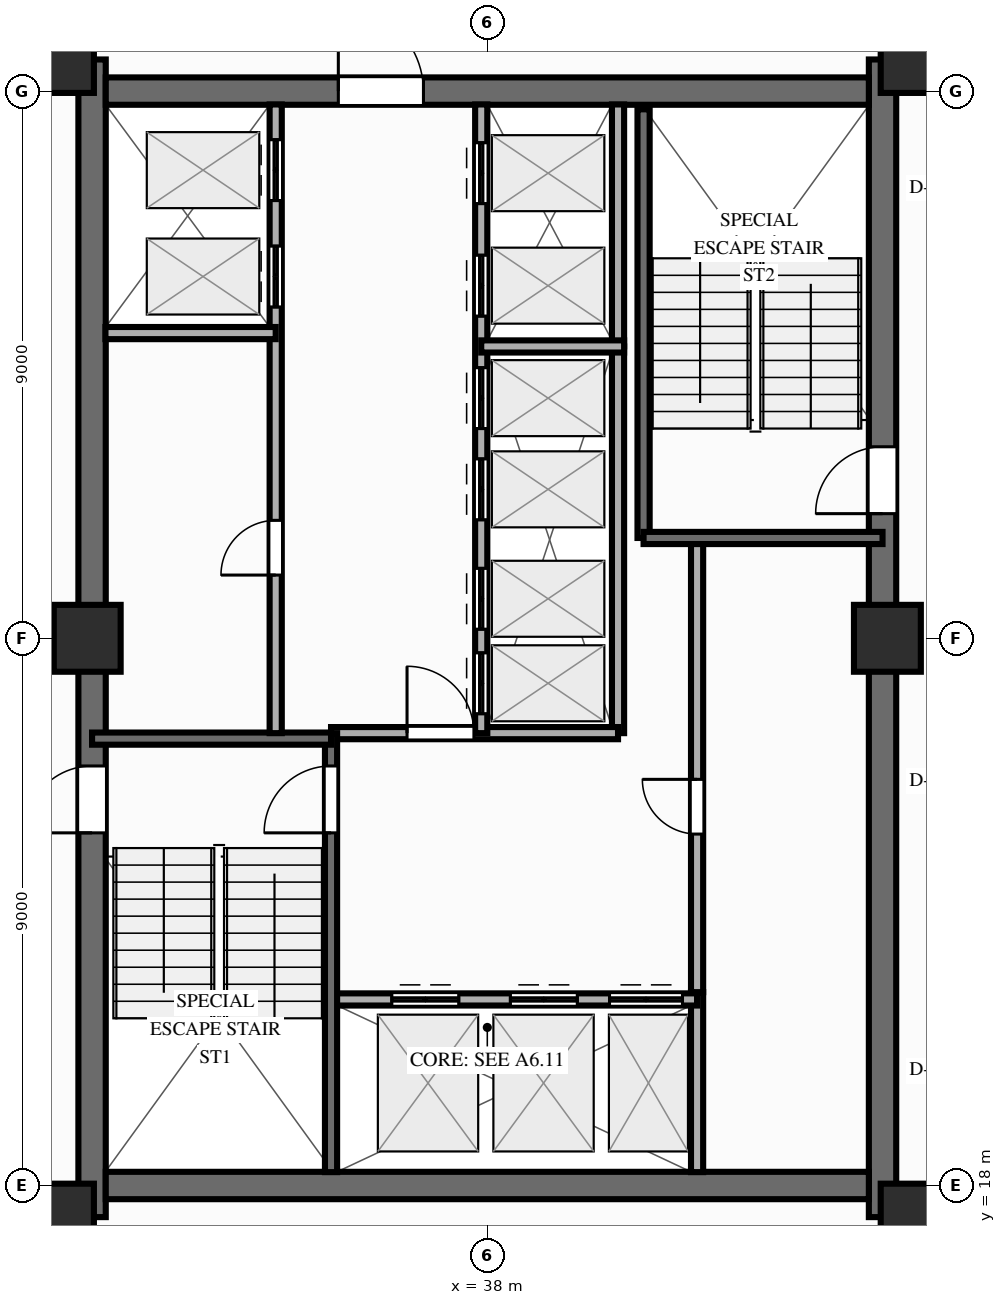
"""IFC4 building model, lengths in metres.
Left out: names, types, materials, properties, quantities, classifications, styles, units other than length and angle.
Written with IfcOpenShell. Run it as: python <this file> out.ifc"""

import sys

from ifc_helpers import new_model, si_unit, direction, frame, frame_2d, origin, origin_2d, place, context, subcontext, project, spatial, rectangle, extrude, source, transform, mapped, element, fill, save


model = new_model("IFC4")
c1 = context("Model", 3, precision=1e-05, world=origin(), true_north=direction((0.0, 1.0)))
c2 = subcontext(c1, "Body", "Model", "MODEL_VIEW")
j1 = project(units=[si_unit("LENGTHUNIT", "METRE"), si_unit("PLANEANGLEUNIT", "RADIAN")], contexts=[c1])
p1 = place(None, origin())
s1 = spatial("IfcSite", under=j1, at=p1, CompositionType="ELEMENT")
p2 = place(p1, origin())
s2 = spatial("IfcBuilding", under=s1, at=p2, CompositionType="ELEMENT")
p3 = place(p2, frame((0.0, 0.0, 169.0)))
s3 = spatial("IfcBuildingStorey", under=s2, at=p3, CompositionType="ELEMENT", Elevation=169.0)
p4 = place(p3, frame((31.5, 17.48, 0.0), z_axis=(0.0, 0.0, 1.0), x_axis=(0.0, 1.0, 0.0)))
e1 = element("IfcWall", 1, at=p4, inside=s3, PredefinedType="SHEAR", context=c2, shape_type="SweptSolid", body=[
    extrude(rectangle(XDim=19.04, YDim=0.45, at=frame_2d((9.52, 0.0))), origin(), (0.0, 0.0, 1.0), 3.9),
])
p5 = place(p4, frame((6.32, 0.0, 0.0)))
e2 = element("IfcOpeningElement", 2, at=p5, cuts=e1, PredefinedType="OPENING", context=c2, shape_type="SweptSolid", body=[
    extrude(rectangle(XDim=1.1, YDim=2.15, at=frame_2d((0.55, 1.075))), frame((0.0, 0.237, 0.0), z_axis=(0.0, -1.0, 0.0), x_axis=(1.0, 0.0, 0.0)), (0.0, 0.0, 1.0), 0.474),
])
p6 = place(p3, frame((44.5, 17.48, 0.0), z_axis=(0.0, 0.0, 1.0), x_axis=(0.0, 1.0, 0.0)))
e3 = element("IfcWall", 3, at=p6, inside=s3, PredefinedType="SHEAR", context=c2, shape_type="SweptSolid", body=[
    extrude(rectangle(XDim=19.04, YDim=0.45, at=frame_2d((9.52, 0.0))), origin(), (0.0, 0.0, 1.0), 3.9),
])
p7 = place(p6, frame((12.67, 0.0, 0.0), z_axis=(0.0, 0.0, 1.0), x_axis=(-1.0, 0.0, 0.0)))
e4 = element("IfcOpeningElement", 4, at=p7, cuts=e3, PredefinedType="OPENING", context=c2, shape_type="SweptSolid", body=[
    extrude(rectangle(XDim=1.1, YDim=2.15, at=frame_2d((0.55, 1.075))), frame((0.0, 0.237, 0.0), z_axis=(0.0, -1.0, 0.0), x_axis=(1.0, 0.0, 0.0)), (0.0, 0.0, 1.0), 0.474),
])
p8 = place(p3, frame((31.725, 18.0, 0.0), z_axis=(0.0, 0.0, 1.0), x_axis=(1.0, 0.0, 0.0)))
e5 = element("IfcWall", 5, at=p8, inside=s3, PredefinedType="SHEAR", context=c2, shape_type="SweptSolid", body=[
    extrude(rectangle(XDim=12.55, YDim=0.45, at=frame_2d((6.275, 0.0))), origin(), (0.0, 0.0, 1.0), 3.9),
])
p9 = place(p3, frame((31.725, 36.0, 0.0), z_axis=(0.0, 0.0, 1.0), x_axis=(1.0, 0.0, 0.0)))
e6 = element("IfcWall", 6, at=p9, inside=s3, PredefinedType="SHEAR", context=c2, shape_type="SweptSolid", body=[
    extrude(rectangle(XDim=12.55, YDim=0.45, at=frame_2d((6.275, 0.0))), origin(), (0.0, 0.0, 1.0), 3.9),
])
p10 = place(p9, frame((5.225, 0.0, 0.0), z_axis=(0.0, 0.0, 1.0), x_axis=(-1.0, 0.0, 0.0)))
e7 = element("IfcOpeningElement", 7, at=p10, cuts=e6, PredefinedType="OPENING", context=c2, shape_type="SweptSolid", body=[
    extrude(rectangle(XDim=1.4, YDim=2.15, at=frame_2d((0.7, 1.075))), frame((0.0, 0.237, 0.0), z_axis=(0.0, -1.0, 0.0), x_axis=(1.0, 0.0, 0.0)), (0.0, 0.0, 1.0), 0.474),
])
m1 = source(origin(), c2, "Body", "SweptSolid", [
    extrude(rectangle(XDim=1.1, YDim=1.1, at=origin_2d()), origin(), (0.0, 0.0, 1.0), 3.9),
])
for number, where, z_axis, x_axis in (
    (8, (30.98, 17.48, 0.0), (0.0, 0.0, 1.0), (1.0, 0.0, 0.0)),
    (9, (45.02, 17.48, 0.0), (0.0, 0.0, 1.0), (1.0, 0.0, 0.0)),
    (10, (30.98, 36.52, 0.0), (0.0, 0.0, 1.0), (1.0, 0.0, 0.0)),
    (11, (45.02, 36.52, 0.0), (0.0, 0.0, 1.0), (1.0, 0.0, 0.0)),
    (12, (31.42, 27.0, 0.0), (0.0, 0.0, 1.0), (1.0, 0.0, 0.0)),
    (13, (44.58, 27.0, 0.0), (0.0, 0.0, 1.0), (1.0, 0.0, 0.0)),
):
    element("IfcColumn", number, at=place(p3, frame(where, z_axis=z_axis, x_axis=x_axis)), inside=s3, PredefinedType="COLUMN", context=c2, shape_type="MappedRepresentation", body=[
        mapped(m1, transform((0.0, 0.0, 0.0), scale=1.0)),
    ])
p11 = place(p3, frame((41.45, 18.22, 0.0), z_axis=(0.0, 0.0, 1.0), x_axis=(0.0, 1.0, 0.0)))
e14 = element("IfcWall", 14, at=p11, inside=s3, PredefinedType="PARTITIONING", context=c2, shape_type="SweptSolid", body=[
    extrude(rectangle(XDim=2.96, YDim=0.2, at=frame_2d((1.48, 0.0))), origin(), (0.0, 0.0, 1.0), 3.56),
])
p12 = place(p3, frame((41.45, 21.18, 0.0), z_axis=(0.0, 0.0, 1.0), x_axis=(0.0, 1.0, 0.0)))
e15 = element("IfcWall", 15, at=p12, inside=s3, PredefinedType="PARTITIONING", context=c2, shape_type="SweptSolid", body=[
    extrude(rectangle(XDim=7.42, YDim=0.2, at=frame_2d((3.71, 0.0))), origin(), (0.0, 0.0, 1.0), 3.56),
])
p13 = place(p12, frame((2.6, 0.0, 0.0)))
e16 = element("IfcOpeningElement", 16, at=p13, cuts=e15, PredefinedType="OPENING", context=c2, shape_type="SweptSolid", body=[
    extrude(rectangle(XDim=0.9, YDim=2.1, at=frame_2d((0.45, 1.05))), frame((0.0, 0.112, 0.0), z_axis=(0.0, -1.0, 0.0), x_axis=(1.0, 0.0, 0.0)), (0.0, 0.0, 1.0), 0.224),
])
p14 = place(p3, frame((40.15, 25.44, 0.0), z_axis=(0.0, 0.0, 1.0), x_axis=(0.0, 1.0, 0.0)))
e17 = element("IfcWall", 17, at=p14, inside=s3, PredefinedType="PARTITIONING", context=c2, shape_type="SweptSolid", body=[
    extrude(rectangle(XDim=6.36, YDim=0.2, at=frame_2d((3.18, 0.0))), origin(), (0.0, 0.0, 1.0), 3.56),
])
p15 = place(p3, frame((40.15, 31.8, 0.0), z_axis=(0.0, 0.0, 1.0), x_axis=(0.0, 1.0, 0.0)))
e18 = element("IfcWall", 18, at=p15, inside=s3, PredefinedType="PARTITIONING", context=c2, shape_type="SweptSolid", body=[
    extrude(rectangle(XDim=3.98, YDim=0.2, at=frame_2d((1.99, 0.0))), origin(), (0.0, 0.0, 1.0), 3.56),
])
p16 = place(p3, frame((35.43, 21.06, 0.0), z_axis=(0.0, 0.0, 1.0), x_axis=(1.0, 0.0, 0.0)))
e19 = element("IfcWall", 19, at=p16, inside=s3, PredefinedType="PARTITIONING", context=c2, shape_type="SweptSolid", body=[
    extrude(rectangle(XDim=6.02, YDim=0.2, at=frame_2d((3.01, 0.0))), origin(), (0.0, 0.0, 1.0), 3.56),
])
p17 = place(p16, frame((1.0, 0.0, 0.0)))
e20 = element("IfcOpeningElement", 20, at=p17, cuts=e19, PredefinedType="OPENING", context=c2, shape_type="SweptSolid", body=[
    extrude(rectangle(XDim=1.1, YDim=2.15, at=frame_2d((0.55, 1.075))), frame((0.0, 0.112, 0.0), z_axis=(0.0, -1.0, 0.0), x_axis=(1.0, 0.0, 0.0)), (0.0, 0.0, 1.0), 0.224),
])
p18 = place(p16, frame((2.95, 0.0, 0.0)))
e21 = element("IfcOpeningElement", 21, at=p18, cuts=e19, PredefinedType="OPENING", context=c2, shape_type="SweptSolid", body=[
    extrude(rectangle(XDim=1.1, YDim=2.15, at=frame_2d((0.55, 1.075))), frame((0.0, 0.112, 0.0), z_axis=(0.0, -1.0, 0.0), x_axis=(1.0, 0.0, 0.0)), (0.0, 0.0, 1.0), 0.224),
])
p19 = place(p16, frame((4.58, 0.0, 0.0)))
e22 = element("IfcOpeningElement", 22, at=p19, cuts=e19, PredefinedType="OPENING", context=c2, shape_type="SweptSolid", body=[
    extrude(rectangle(XDim=1.2, YDim=2.15, at=frame_2d((0.6, 1.075))), frame((0.0, 0.112, 0.0), z_axis=(0.0, -1.0, 0.0), x_axis=(1.0, 0.0, 0.0)), (0.0, 0.0, 1.0), 0.224),
])
p20 = place(p3, frame((35.43, 25.44, 0.0), z_axis=(0.0, 0.0, 1.0), x_axis=(1.0, 0.0, 0.0)))
e23 = element("IfcWall", 23, at=p20, inside=s3, PredefinedType="PARTITIONING", context=c2, shape_type="SweptSolid", body=[
    extrude(rectangle(XDim=4.72, YDim=0.2, at=frame_2d((2.36, 0.0))), origin(), (0.0, 0.0, 1.0), 3.56),
])
p21 = place(p20, frame((1.25, 0.0, 0.0)))
e24 = element("IfcOpeningElement", 24, at=p21, cuts=e23, PredefinedType="OPENING", context=c2, shape_type="SweptSolid", body=[
    extrude(rectangle(XDim=1.1, YDim=2.15, at=frame_2d((0.55, 1.075))), frame((0.0, 0.112, 0.0), z_axis=(0.0, -1.0, 0.0), x_axis=(1.0, 0.0, 0.0)), (0.0, 0.0, 1.0), 0.224),
])
p22 = place(p3, frame((35.43, 18.22, 0.0), z_axis=(0.0, 0.0, 1.0), x_axis=(0.0, 1.0, 0.0)))
e25 = element("IfcWall", 25, at=p22, inside=s3, PredefinedType="SOLIDWALL", context=c2, shape_type="SweptSolid", body=[
    extrude(rectangle(XDim=7.22, YDim=0.2, at=frame_2d((3.61, 0.0))), origin(), (0.0, 0.0, 1.0), 3.69),
])
p23 = place(p22, frame((6.68, 0.0, 0.0), z_axis=(0.0, 0.0, 1.0), x_axis=(-1.0, 0.0, 0.0)))
e26 = element("IfcOpeningElement", 26, at=p23, cuts=e25, PredefinedType="OPENING", context=c2, shape_type="SweptSolid", body=[
    extrude(rectangle(XDim=1.1, YDim=2.15, at=frame_2d((0.55, 1.075))), frame((0.0, 0.112, 0.0), z_axis=(0.0, -1.0, 0.0), x_axis=(1.0, 0.0, 0.0)), (0.0, 0.0, 1.0), 0.224),
])
p24 = place(p3, frame((31.5, 25.35, 0.0), z_axis=(0.0, 0.0, 1.0), x_axis=(1.0, 0.0, 0.0)))
e27 = element("IfcWall", 27, at=p24, inside=s3, PredefinedType="SOLIDWALL", context=c2, shape_type="SweptSolid", body=[
    extrude(rectangle(XDim=3.93, YDim=0.2, at=frame_2d((1.965, 0.0))), origin(), (0.0, 0.0, 1.0), 3.69),
])
p25 = place(p3, frame((40.57, 28.65, 0.0), z_axis=(0.0, 0.0, 1.0), x_axis=(0.0, 1.0, 0.0)))
e28 = element("IfcWall", 28, at=p25, inside=s3, PredefinedType="SOLIDWALL", context=c2, shape_type="SweptSolid", body=[
    extrude(rectangle(XDim=7.05, YDim=0.2, at=frame_2d((3.525, 0.0))), origin(), (0.0, 0.0, 1.0), 3.69),
])
p26 = place(p3, frame((40.57, 28.65, 0.0), z_axis=(0.0, 0.0, 1.0), x_axis=(1.0, 0.0, 0.0)))
e29 = element("IfcWall", 29, at=p26, inside=s3, PredefinedType="SOLIDWALL", context=c2, shape_type="SweptSolid", body=[
    extrude(rectangle(XDim=3.93, YDim=0.2, at=frame_2d((1.965, 0.0))), origin(), (0.0, 0.0, 1.0), 3.69),
])
p27 = place(p3, frame((34.52, 25.44, 0.0), z_axis=(0.0, 0.0, 1.0), x_axis=(0.0, 1.0, 0.0)))
e30 = element("IfcWall", 30, at=p27, inside=s3, PredefinedType="PARTITIONING", context=c2, shape_type="SweptSolid", body=[
    extrude(rectangle(XDim=10.34, YDim=0.2, at=frame_2d((5.17, 0.0))), origin(), (0.0, 0.0, 1.0), 3.56),
])
p28 = place(p27, frame((2.6, 0.0, 0.0)))
e31 = element("IfcOpeningElement", 31, at=p28, cuts=e30, PredefinedType="OPENING", context=c2, shape_type="SweptSolid", body=[
    extrude(rectangle(XDim=0.9, YDim=2.1, at=frame_2d((0.45, 1.05))), frame((0.0, 0.112, 0.0), z_axis=(0.0, -1.0, 0.0), x_axis=(1.0, 0.0, 0.0)), (0.0, 0.0, 1.0), 0.224),
])
p29 = place(p27, frame((7.01, 0.0, 0.0)))
e32 = element("IfcOpeningElement", 32, at=p29, cuts=e30, PredefinedType="OPENING", context=c2, shape_type="SweptSolid", body=[
    extrude(rectangle(XDim=1.0, YDim=2.15, at=frame_2d((0.5, 1.075))), frame((0.0, 0.112, 0.0), z_axis=(0.0, -1.0, 0.0), x_axis=(1.0, 0.0, 0.0)), (0.0, 0.0, 1.0), 0.224),
])
p30 = place(p27, frame((8.76, 0.0, 0.0)))
e33 = element("IfcOpeningElement", 33, at=p30, cuts=e30, PredefinedType="OPENING", context=c2, shape_type="SweptSolid", body=[
    extrude(rectangle(XDim=1.0, YDim=2.15, at=frame_2d((0.5, 1.075))), frame((0.0, 0.112, 0.0), z_axis=(0.0, -1.0, 0.0), x_axis=(1.0, 0.0, 0.0)), (0.0, 0.0, 1.0), 0.224),
])
p31 = place(p3, frame((31.72, 32.02, 0.0), z_axis=(0.0, 0.0, 1.0), x_axis=(1.0, 0.0, 0.0)))
e34 = element("IfcWall", 34, at=p31, inside=s3, PredefinedType="PARTITIONING", context=c2, shape_type="SweptSolid", body=[
    extrude(rectangle(XDim=2.8, YDim=0.2, at=frame_2d((1.4, 0.0))), origin(), (0.0, 0.0, 1.0), 3.56),
])
p32 = place(p3, frame((37.9, 25.44, 0.0), z_axis=(0.0, 0.0, 1.0), x_axis=(0.0, 1.0, 0.0)))
e35 = element("IfcWall", 35, at=p32, inside=s3, PredefinedType="PARTITIONING", context=c2, shape_type="SweptSolid", body=[
    extrude(rectangle(XDim=10.34, YDim=0.2, at=frame_2d((5.17, 0.0))), origin(), (0.0, 0.0, 1.0), 3.56),
])
p33 = place(p32, frame((0.32, 0.0, 0.0)))
e36 = element("IfcOpeningElement", 36, at=p33, cuts=e35, PredefinedType="OPENING", context=c2, shape_type="SweptSolid", body=[
    extrude(rectangle(XDim=1.0, YDim=2.15, at=frame_2d((0.5, 1.075))), frame((0.0, 0.112, 0.0), z_axis=(0.0, -1.0, 0.0), x_axis=(1.0, 0.0, 0.0)), (0.0, 0.0, 1.0), 0.224),
])
p34 = place(p32, frame((1.71, 0.0, 0.0)))
e37 = element("IfcOpeningElement", 37, at=p34, cuts=e35, PredefinedType="OPENING", context=c2, shape_type="SweptSolid", body=[
    extrude(rectangle(XDim=1.0, YDim=2.15, at=frame_2d((0.5, 1.075))), frame((0.0, 0.112, 0.0), z_axis=(0.0, -1.0, 0.0), x_axis=(1.0, 0.0, 0.0)), (0.0, 0.0, 1.0), 0.224),
])
p35 = place(p32, frame((3.51, 0.0, 0.0)))
e38 = element("IfcOpeningElement", 38, at=p35, cuts=e35, PredefinedType="OPENING", context=c2, shape_type="SweptSolid", body=[
    extrude(rectangle(XDim=1.0, YDim=2.15, at=frame_2d((0.5, 1.075))), frame((0.0, 0.112, 0.0), z_axis=(0.0, -1.0, 0.0), x_axis=(1.0, 0.0, 0.0)), (0.0, 0.0, 1.0), 0.224),
])
p36 = place(p32, frame((5.01, 0.0, 0.0)))
e39 = element("IfcOpeningElement", 39, at=p36, cuts=e35, PredefinedType="OPENING", context=c2, shape_type="SweptSolid", body=[
    extrude(rectangle(XDim=1.0, YDim=2.15, at=frame_2d((0.5, 1.075))), frame((0.0, 0.112, 0.0), z_axis=(0.0, -1.0, 0.0), x_axis=(1.0, 0.0, 0.0)), (0.0, 0.0, 1.0), 0.224),
])
p37 = place(p32, frame((6.86, 0.0, 0.0)))
e40 = element("IfcOpeningElement", 40, at=p37, cuts=e35, PredefinedType="OPENING", context=c2, shape_type="SweptSolid", body=[
    extrude(rectangle(XDim=1.0, YDim=2.15, at=frame_2d((0.5, 1.075))), frame((0.0, 0.112, 0.0), z_axis=(0.0, -1.0, 0.0), x_axis=(1.0, 0.0, 0.0)), (0.0, 0.0, 1.0), 0.224),
])
p38 = place(p32, frame((8.71, 0.0, 0.0)))
e41 = element("IfcOpeningElement", 41, at=p38, cuts=e35, PredefinedType="OPENING", context=c2, shape_type="SweptSolid", body=[
    extrude(rectangle(XDim=1.0, YDim=2.15, at=frame_2d((0.5, 1.075))), frame((0.0, 0.112, 0.0), z_axis=(0.0, -1.0, 0.0), x_axis=(1.0, 0.0, 0.0)), (0.0, 0.0, 1.0), 0.224),
])
p39 = place(p3, frame((37.9, 31.8, 0.0), z_axis=(0.0, 0.0, 1.0), x_axis=(1.0, 0.0, 0.0)))
e42 = element("IfcWall", 42, at=p39, inside=s3, PredefinedType="PARTITIONING", context=c2, shape_type="SweptSolid", body=[
    extrude(rectangle(XDim=2.35, YDim=0.2, at=frame_2d((1.175, 0.0))), origin(), (0.0, 0.0, 1.0), 3.56),
])
m2 = source(origin(), c2, "Body", "SweptSolid", [
    extrude(rectangle(XDim=1.1, YDim=2.15, at=frame_2d((0.55, 1.075))), frame((0.0, 0.025, 0.0), z_axis=(0.0, -1.0, 0.0), x_axis=(1.0, 0.0, 0.0)), (0.0, 0.0, 1.0), 0.05),
])
p40 = place(p5, origin())
e43 = element("IfcDoor", 43, at=p40, inside=s3, OperationType="SINGLE_SWING_LEFT", PredefinedType="DOOR", context=c2, shape_type="MappedRepresentation", body=[
    mapped(m2, transform((0.0, 0.0, 0.0), scale=1.0)),
])
fill(e2, e43)
p41 = place(p7, origin())
e44 = element("IfcDoor", 44, at=p41, inside=s3, OperationType="SINGLE_SWING_RIGHT", PredefinedType="DOOR", context=c2, shape_type="MappedRepresentation", body=[
    mapped(m2, transform((0.0, 0.0, 0.0), scale=1.0)),
])
fill(e4, e44)
m3 = source(origin(), c2, "Body", "SweptSolid", [
    extrude(rectangle(XDim=1.4, YDim=2.15, at=frame_2d((0.7, 1.075))), frame((0.0, 0.025, 0.0), z_axis=(0.0, -1.0, 0.0), x_axis=(1.0, 0.0, 0.0)), (0.0, 0.0, 1.0), 0.05),
])
p42 = place(p10, origin())
e45 = element("IfcDoor", 45, at=p42, inside=s3, OperationType="SINGLE_SWING_RIGHT", PredefinedType="DOOR", context=c2, shape_type="MappedRepresentation", body=[
    mapped(m3, transform((0.0, 0.0, 0.0), scale=1.0)),
])
fill(e7, e45)
m4 = source(origin(), c2, "Body", "SweptSolid", [
    extrude(rectangle(XDim=0.9, YDim=2.1, at=frame_2d((0.45, 1.05))), frame((0.0, 0.025, 0.0), z_axis=(0.0, -1.0, 0.0), x_axis=(1.0, 0.0, 0.0)), (0.0, 0.0, 1.0), 0.05),
])
p43 = place(p13, origin())
e46 = element("IfcDoor", 46, at=p43, inside=s3, OperationType="SINGLE_SWING_RIGHT", PredefinedType="DOOR", context=c2, shape_type="MappedRepresentation", body=[
    mapped(m4, transform((0.0, 0.0, 0.0), scale=1.0)),
])
fill(e16, e46)
p44 = place(p17, origin())
e47 = element("IfcDoor", 47, at=p44, inside=s3, OperationType="DOUBLE_DOOR_SLIDING", PredefinedType="DOOR", context=c2, shape_type="MappedRepresentation", body=[
    mapped(m2, transform((0.0, 0.0, 0.0), scale=1.0)),
])
fill(e20, e47)
p45 = place(p18, origin())
e48 = element("IfcDoor", 48, at=p45, inside=s3, OperationType="DOUBLE_DOOR_SLIDING", PredefinedType="DOOR", context=c2, shape_type="MappedRepresentation", body=[
    mapped(m2, transform((0.0, 0.0, 0.0), scale=1.0)),
])
fill(e21, e48)
m5 = source(origin(), c2, "Body", "SweptSolid", [
    extrude(rectangle(XDim=1.2, YDim=2.15, at=frame_2d((0.6, 1.075))), frame((0.0, 0.025, 0.0), z_axis=(0.0, -1.0, 0.0), x_axis=(1.0, 0.0, 0.0)), (0.0, 0.0, 1.0), 0.05),
])
p46 = place(p19, origin())
e49 = element("IfcDoor", 49, at=p46, inside=s3, OperationType="DOUBLE_DOOR_SLIDING", PredefinedType="DOOR", context=c2, shape_type="MappedRepresentation", body=[
    mapped(m5, transform((0.0, 0.0, 0.0), scale=1.0)),
])
fill(e22, e49)
p47 = place(p21, origin())
e50 = element("IfcDoor", 50, at=p47, inside=s3, OperationType="SINGLE_SWING_LEFT", PredefinedType="DOOR", context=c2, shape_type="MappedRepresentation", body=[
    mapped(m2, transform((0.0, 0.0, 0.0), scale=1.0)),
])
fill(e24, e50)
p48 = place(p23, origin())
e51 = element("IfcDoor", 51, at=p48, inside=s3, OperationType="SINGLE_SWING_RIGHT", PredefinedType="DOOR", context=c2, shape_type="MappedRepresentation", body=[
    mapped(m2, transform((0.0, 0.0, 0.0), scale=1.0)),
])
fill(e26, e51)
p49 = place(p28, origin())
e52 = element("IfcDoor", 52, at=p49, inside=s3, OperationType="SINGLE_SWING_LEFT", PredefinedType="DOOR", context=c2, shape_type="MappedRepresentation", body=[
    mapped(m4, transform((0.0, 0.0, 0.0), scale=1.0)),
])
fill(e31, e52)
m6 = source(origin(), c2, "Body", "SweptSolid", [
    extrude(rectangle(XDim=1.0, YDim=2.15, at=frame_2d((0.5, 1.075))), frame((0.0, 0.025, 0.0), z_axis=(0.0, -1.0, 0.0), x_axis=(1.0, 0.0, 0.0)), (0.0, 0.0, 1.0), 0.05),
])
p50 = place(p29, origin())
e53 = element("IfcDoor", 53, at=p50, inside=s3, OperationType="DOUBLE_DOOR_SLIDING", PredefinedType="DOOR", context=c2, shape_type="MappedRepresentation", body=[
    mapped(m6, transform((0.0, 0.0, 0.0), scale=1.0)),
])
fill(e32, e53)
p51 = place(p30, origin())
e54 = element("IfcDoor", 54, at=p51, inside=s3, OperationType="DOUBLE_DOOR_SLIDING", PredefinedType="DOOR", context=c2, shape_type="MappedRepresentation", body=[
    mapped(m6, transform((0.0, 0.0, 0.0), scale=1.0)),
])
fill(e33, e54)
p52 = place(p33, origin())
e55 = element("IfcDoor", 55, at=p52, inside=s3, OperationType="DOUBLE_DOOR_SLIDING", PredefinedType="DOOR", context=c2, shape_type="MappedRepresentation", body=[
    mapped(m6, transform((0.0, 0.0, 0.0), scale=1.0)),
])
fill(e36, e55)
p53 = place(p34, origin())
e56 = element("IfcDoor", 56, at=p53, inside=s3, OperationType="DOUBLE_DOOR_SLIDING", PredefinedType="DOOR", context=c2, shape_type="MappedRepresentation", body=[
    mapped(m6, transform((0.0, 0.0, 0.0), scale=1.0)),
])
fill(e37, e56)
p54 = place(p35, origin())
e57 = element("IfcDoor", 57, at=p54, inside=s3, OperationType="DOUBLE_DOOR_SLIDING", PredefinedType="DOOR", context=c2, shape_type="MappedRepresentation", body=[
    mapped(m6, transform((0.0, 0.0, 0.0), scale=1.0)),
])
fill(e38, e57)
p55 = place(p36, origin())
e58 = element("IfcDoor", 58, at=p55, inside=s3, OperationType="DOUBLE_DOOR_SLIDING", PredefinedType="DOOR", context=c2, shape_type="MappedRepresentation", body=[
    mapped(m6, transform((0.0, 0.0, 0.0), scale=1.0)),
])
fill(e39, e58)
p56 = place(p37, origin())
e59 = element("IfcDoor", 59, at=p56, inside=s3, OperationType="DOUBLE_DOOR_SLIDING", PredefinedType="DOOR", context=c2, shape_type="MappedRepresentation", body=[
    mapped(m6, transform((0.0, 0.0, 0.0), scale=1.0)),
])
fill(e40, e59)
p57 = place(p38, origin())
e60 = element("IfcDoor", 60, at=p57, inside=s3, OperationType="DOUBLE_DOOR_SLIDING", PredefinedType="DOOR", context=c2, shape_type="MappedRepresentation", body=[
    mapped(m6, transform((0.0, 0.0, 0.0), scale=1.0)),
])
fill(e41, e60)
save(model, sys.argv[1])
